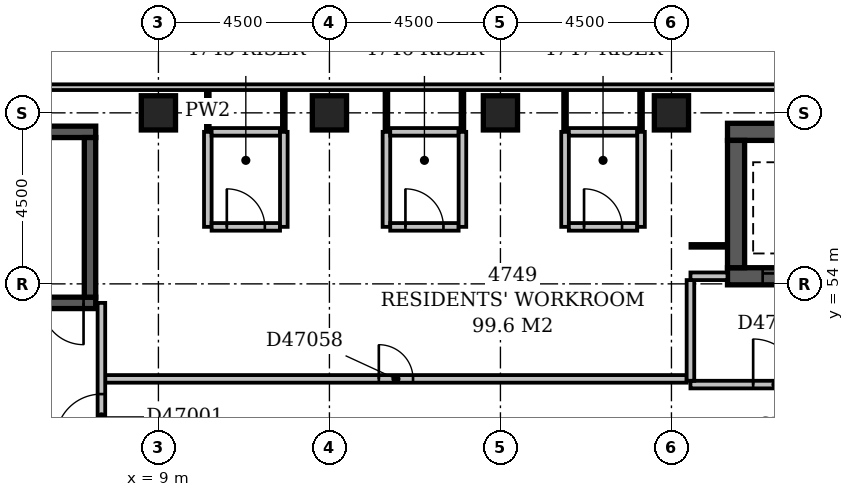
"""IFC4 building model, lengths in metres.
Left out: names, types, materials, properties, quantities, classifications, styles, units other than length and angle.
Written with IfcOpenShell. Run it as: python <this file> out.ifc"""

import sys

from ifc_helpers import new_model, si_unit, direction, frame, frame_2d, origin, origin_2d, place, context, subcontext, project, spatial, rectangle, extrude, element, fill, save


model = new_model("IFC4")
c1 = context("Model", 3, precision=1e-05, world=origin(), true_north=direction((0.0, 1.0)))
c2 = subcontext(c1, "Body", "Model", "MODEL_VIEW")
j1 = project(units=[si_unit("LENGTHUNIT", "METRE"), si_unit("PLANEANGLEUNIT", "RADIAN")], contexts=[c1])
p1 = place(None, origin())
s1 = spatial("IfcSite", under=j1, at=p1, CompositionType="ELEMENT")
p2 = place(p1, origin())
s2 = spatial("IfcBuilding", under=s1, at=p2, CompositionType="ELEMENT")
p3 = place(p2, frame((0.0, 0.0, 186.2)))
s3 = spatial("IfcBuildingStorey", under=s2, at=p3, CompositionType="ELEMENT", Elevation=186.2)
p4 = place(p3, frame((0.35, 53.5, -0.35), z_axis=(0.0, 0.0, 1.0), x_axis=(1.0, 0.0, 0.0)))
e1 = element("IfcWall", 1, at=p4, inside=s3, PredefinedType="SHEAR", context=c2, shape_type="SweptSolid", body=[
    extrude(rectangle(XDim=7.0, YDim=0.3, at=frame_2d((3.5, 0.0))), origin(), (0.0, 0.0, 1.0), 3.65),
])
p5 = place(p4, frame((5.58, 0.0, 0.35)))
e2 = element("IfcOpeningElement", 2, at=p5, cuts=e1, PredefinedType="OPENING", context=c2, shape_type="SweptSolid", body=[
    extrude(rectangle(XDim=1.1, YDim=2.1, at=frame_2d((0.55, 1.05))), frame((0.0, 0.162, 0.0), z_axis=(0.0, -1.0, 0.0), x_axis=(1.0, 0.0, 0.0)), (0.0, 0.0, 1.0), 0.324),
])
p6 = place(p3, frame((0.35, 58.0, -0.35), z_axis=(0.0, 0.0, 1.0), x_axis=(1.0, 0.0, 0.0)))
e3 = element("IfcWall", 3, at=p6, inside=s3, PredefinedType="SHEAR", context=c2, shape_type="SweptSolid", body=[
    extrude(rectangle(XDim=7.0, YDim=0.3, at=frame_2d((3.5, 0.0))), origin(), (0.0, 0.0, 1.0), 3.65),
])
p7 = place(p3, frame((7.2, 53.65, -0.35), z_axis=(0.0, 0.0, 1.0), x_axis=(0.0, 1.0, 0.0)))
e4 = element("IfcWall", 4, at=p7, inside=s3, PredefinedType="SHEAR", context=c2, shape_type="SweptSolid", body=[
    extrude(rectangle(XDim=4.2, YDim=0.3, at=frame_2d((2.1, 0.0))), origin(), (0.0, 0.0, 1.0), 3.65),
])
p8 = place(p3, frame((23.975, 54.2, -0.35), z_axis=(0.0, 0.0, 1.0), x_axis=(1.0, 0.0, 0.0)))
e5 = element("IfcWall", 5, at=p8, inside=s3, PredefinedType="SHEAR", context=c2, shape_type="SweptSolid", body=[
    extrude(rectangle(XDim=2.95, YDim=0.45, at=frame_2d((1.475, 0.0))), origin(), (0.0, 0.0, 1.0), 3.65),
])
p9 = place(p8, frame((0.925, 0.0, 0.35)))
e6 = element("IfcOpeningElement", 6, at=p9, cuts=e5, PredefinedType="OPENING", context=c2, shape_type="SweptSolid", body=[
    extrude(rectangle(XDim=1.1, YDim=2.1, at=frame_2d((0.55, 1.05))), frame((0.0, 0.237, 0.0), z_axis=(0.0, -1.0, 0.0), x_axis=(1.0, 0.0, 0.0)), (0.0, 0.0, 1.0), 0.474),
])
p10 = place(p3, frame((23.975, 58.0, -0.35), z_axis=(0.0, 0.0, 1.0), x_axis=(1.0, 0.0, 0.0)))
e7 = element("IfcWall", 7, at=p10, inside=s3, PredefinedType="SHEAR", context=c2, shape_type="SweptSolid", body=[
    extrude(rectangle(XDim=2.95, YDim=0.45, at=frame_2d((1.475, 0.0))), origin(), (0.0, 0.0, 1.0), 3.65),
])
p11 = place(p3, frame((24.2, 54.425, -0.35), z_axis=(0.0, 0.0, 1.0), x_axis=(0.0, 1.0, 0.0)))
e8 = element("IfcWall", 8, at=p11, inside=s3, PredefinedType="SHEAR", context=c2, shape_type="SweptSolid", body=[
    extrude(rectangle(XDim=3.35, YDim=0.45, at=frame_2d((1.675, 0.0))), origin(), (0.0, 0.0, 1.0), 3.65),
])
for number, where, z_axis, x_axis in (
    (9, (9.0, 58.5, -0.35), (0.0, 0.0, 1.0), (1.0, 0.0, 0.0)),
    (10, (13.5, 58.5, -0.35), (0.0, 0.0, 1.0), (1.0, 0.0, 0.0)),
    (11, (18.0, 58.5, -0.35), (0.0, 0.0, 1.0), (1.0, 0.0, 0.0)),
    (12, (22.5, 58.5, -0.35), (0.0, 0.0, 1.0), (1.0, 0.0, 0.0)),
):
    element("IfcColumn", number, at=place(p3, frame(where, z_axis=z_axis, x_axis=x_axis)), inside=s3, PredefinedType="COLUMN", context=c2, shape_type="SweptSolid", body=[
        extrude(rectangle(XDim=0.9, YDim=0.9, at=origin_2d()), origin(), (0.0, 0.0, 1.0), 3.65),
    ])
p12 = place(p3, frame((50.1, 59.175, 0.0), z_axis=(0.0, 0.0, 1.0), x_axis=(-1.0, 0.0, 0.0)))
e13 = element("IfcWall", 13, at=p12, inside=s3, PredefinedType="STANDARD", context=c2, shape_type="SweptSolid", body=[
    extrude(rectangle(XDim=50.85, YDim=0.15, at=frame_2d((25.425, 0.0))), origin(), (0.0, 0.0, 1.0), 2.7),
])
p13 = place(p12, frame((19.65, 0.0, 0.6)))
e14 = element("IfcOpeningElement", 14, at=p13, cuts=e13, PredefinedType="OPENING", context=c2, shape_type="SweptSolid", body=[
    extrude(rectangle(XDim=2.4, YDim=1.8, at=frame_2d((1.2, 0.9))), frame((0.0, 0.087, 0.0), z_axis=(0.0, -1.0, 0.0), x_axis=(1.0, 0.0, 0.0)), (0.0, 0.0, 1.0), 0.174),
])
p14 = place(p3, frame((23.0, 51.35, 0.0), z_axis=(0.0, 0.0, 1.0), x_axis=(1.0, 0.0, 0.0)))
e15 = element("IfcWall", 15, at=p14, inside=s3, PredefinedType="PARTITIONING", context=c2, shape_type="SweptSolid", body=[
    extrude(rectangle(XDim=4.8, YDim=0.2, at=frame_2d((2.4, 0.0))), origin(), (0.0, 0.0, 1.0), 3.3),
])
p15 = place(p14, frame((1.65, 0.0, 0.0)))
e16 = element("IfcOpeningElement", 16, at=p15, cuts=e15, PredefinedType="OPENING", context=c2, shape_type="SweptSolid", body=[
    extrude(rectangle(XDim=1.2, YDim=2.1, at=frame_2d((0.6, 1.05))), frame((0.0, 0.112, 0.0), z_axis=(0.0, -1.0, 0.0), x_axis=(1.0, 0.0, 0.0)), (0.0, 0.0, 1.0), 0.224),
])
p16 = place(p3, frame((23.0, 54.2, 0.0), z_axis=(0.0, 0.0, 1.0), x_axis=(1.0, 0.0, 0.0)))
e17 = element("IfcWall", 17, at=p16, inside=s3, PredefinedType="PARTITIONING", context=c2, shape_type="SweptSolid", body=[
    extrude(rectangle(XDim=0.975, YDim=0.2, at=frame_2d((0.488, 0.0))), origin(), (0.0, 0.0, 1.0), 3.3),
])
p17 = place(p3, frame((23.0, 51.45, 0.0), z_axis=(0.0, 0.0, 1.0), x_axis=(0.0, 1.0, 0.0)))
e18 = element("IfcWall", 18, at=p17, inside=s3, PredefinedType="PARTITIONING", context=c2, shape_type="SweptSolid", body=[
    extrude(rectangle(XDim=2.65, YDim=0.2, at=frame_2d((1.325, 0.0))), origin(), (0.0, 0.0, 1.0), 3.3),
])
p18 = place(p3, frame((7.5, 49.6, 0.0), z_axis=(0.0, 0.0, 1.0), x_axis=(0.0, 1.0, 0.0)))
e19 = element("IfcWall", 19, at=p18, inside=s3, PredefinedType="PARTITIONING", context=c2, shape_type="SweptSolid", body=[
    extrude(rectangle(XDim=3.9, YDim=0.2, at=frame_2d((1.95, 0.0))), origin(), (0.0, 0.0, 1.0), 3.3),
])
p19 = place(p18, frame((0.3, 0.0, 0.0)))
e20 = element("IfcOpeningElement", 20, at=p19, cuts=e19, PredefinedType="OPENING", context=c2, shape_type="SweptSolid", body=[
    extrude(rectangle(XDim=1.2, YDim=2.1, at=frame_2d((0.6, 1.05))), frame((0.0, 0.112, 0.0), z_axis=(0.0, -1.0, 0.0), x_axis=(1.0, 0.0, 0.0)), (0.0, 0.0, 1.0), 0.224),
])
p20 = place(p3, frame((7.6, 51.5, 0.0), z_axis=(0.0, 0.0, 1.0), x_axis=(1.0, 0.0, 0.0)))
e21 = element("IfcWall", 21, at=p20, inside=s3, PredefinedType="PARTITIONING", context=c2, shape_type="SweptSolid", body=[
    extrude(rectangle(XDim=15.3, YDim=0.2, at=frame_2d((7.65, 0.0))), origin(), (0.0, 0.0, 1.0), 3.3),
])
p21 = place(p20, frame((7.2, 0.0, 0.0)))
e22 = element("IfcOpeningElement", 22, at=p21, cuts=e21, PredefinedType="OPENING", context=c2, shape_type="SweptSolid", body=[
    extrude(rectangle(XDim=0.9, YDim=2.1, at=frame_2d((0.45, 1.05))), frame((0.0, 0.112, 0.0), z_axis=(0.0, -1.0, 0.0), x_axis=(1.0, 0.0, 0.0)), (0.0, 0.0, 1.0), 0.224),
])
p22 = place(p3, frame((23.0, 55.0, 0.0), z_axis=(0.0, 0.0, 1.0), x_axis=(1.0, 0.0, 0.0)))
e23 = element("IfcWall", 23, at=p22, inside=s3, PredefinedType="PARTITIONING", context=c2, shape_type="SweptSolid", body=[
    extrude(rectangle(XDim=0.975, YDim=0.1, at=frame_2d((0.488, 0.0))), origin(), (0.0, 0.0, 1.0), 3.3),
])
p23 = place(p3, frame((10.3, 55.5, 0.0), z_axis=(0.0, 0.0, 1.0), x_axis=(0.0, 1.0, 0.0)))
e24 = element("IfcWall", 24, at=p23, inside=s3, PredefinedType="PARTITIONING", context=c2, shape_type="SweptSolid", body=[
    extrude(rectangle(XDim=2.5, YDim=0.2, at=frame_2d((1.25, 0.0))), origin(), (0.0, 0.0, 1.0), 3.3),
])
p24 = place(p3, frame((10.4, 55.5, 0.0), z_axis=(0.0, 0.0, 1.0), x_axis=(1.0, 0.0, 0.0)))
e25 = element("IfcWall", 25, at=p24, inside=s3, PredefinedType="PARTITIONING", context=c2, shape_type="SweptSolid", body=[
    extrude(rectangle(XDim=1.8, YDim=0.2, at=frame_2d((0.9, 0.0))), origin(), (0.0, 0.0, 1.0), 3.3),
])
p25 = place(p24, frame((0.4, 0.0, 0.0)))
e26 = element("IfcOpeningElement", 26, at=p25, cuts=e25, PredefinedType="OPENING", context=c2, shape_type="SweptSolid", body=[
    extrude(rectangle(XDim=1.0, YDim=2.1, at=frame_2d((0.5, 1.05))), frame((0.0, 0.112, 0.0), z_axis=(0.0, -1.0, 0.0), x_axis=(1.0, 0.0, 0.0)), (0.0, 0.0, 1.0), 0.224),
])
for number, where, z_axis, x_axis in (
    (27, (12.3, 55.5, 0.0), (0.0, 0.0, 1.0), (0.0, 1.0, 0.0)),
    (28, (15.0, 55.5, 0.0), (0.0, 0.0, 1.0), (0.0, 1.0, 0.0)),
):
    element("IfcWall", number, at=place(p3, frame(where, z_axis=z_axis, x_axis=x_axis)), inside=s3, PredefinedType="PARTITIONING", context=c2, shape_type="SweptSolid", body=[
        extrude(rectangle(XDim=2.5, YDim=0.2, at=frame_2d((1.25, 0.0))), origin(), (0.0, 0.0, 1.0), 3.3),
    ])
p26 = place(p3, frame((15.1, 55.5, 0.0), z_axis=(0.0, 0.0, 1.0), x_axis=(1.0, 0.0, 0.0)))
e29 = element("IfcWall", 29, at=p26, inside=s3, PredefinedType="PARTITIONING", context=c2, shape_type="SweptSolid", body=[
    extrude(rectangle(XDim=1.8, YDim=0.2, at=frame_2d((0.9, 0.0))), origin(), (0.0, 0.0, 1.0), 3.3),
])
p27 = place(p26, frame((0.4, 0.0, 0.0)))
e30 = element("IfcOpeningElement", 30, at=p27, cuts=e29, PredefinedType="OPENING", context=c2, shape_type="SweptSolid", body=[
    extrude(rectangle(XDim=1.0, YDim=2.1, at=frame_2d((0.5, 1.05))), frame((0.0, 0.112, 0.0), z_axis=(0.0, -1.0, 0.0), x_axis=(1.0, 0.0, 0.0)), (0.0, 0.0, 1.0), 0.224),
])
for number, where, z_axis, x_axis in (
    (31, (17.0, 55.5, 0.0), (0.0, 0.0, 1.0), (0.0, 1.0, 0.0)),
    (32, (19.7, 55.5, 0.0), (0.0, 0.0, 1.0), (0.0, 1.0, 0.0)),
):
    element("IfcWall", number, at=place(p3, frame(where, z_axis=z_axis, x_axis=x_axis)), inside=s3, PredefinedType="PARTITIONING", context=c2, shape_type="SweptSolid", body=[
        extrude(rectangle(XDim=2.5, YDim=0.2, at=frame_2d((1.25, 0.0))), origin(), (0.0, 0.0, 1.0), 3.3),
    ])
p28 = place(p3, frame((19.8, 55.5, 0.0), z_axis=(0.0, 0.0, 1.0), x_axis=(1.0, 0.0, 0.0)))
e33 = element("IfcWall", 33, at=p28, inside=s3, PredefinedType="PARTITIONING", context=c2, shape_type="SweptSolid", body=[
    extrude(rectangle(XDim=1.8, YDim=0.2, at=frame_2d((0.9, 0.0))), origin(), (0.0, 0.0, 1.0), 3.3),
])
p29 = place(p28, frame((0.4, 0.0, 0.0)))
e34 = element("IfcOpeningElement", 34, at=p29, cuts=e33, PredefinedType="OPENING", context=c2, shape_type="SweptSolid", body=[
    extrude(rectangle(XDim=1.0, YDim=2.1, at=frame_2d((0.5, 1.05))), frame((0.0, 0.112, 0.0), z_axis=(0.0, -1.0, 0.0), x_axis=(1.0, 0.0, 0.0)), (0.0, 0.0, 1.0), 0.224),
])
p30 = place(p3, frame((21.7, 55.5, 0.0), z_axis=(0.0, 0.0, 1.0), x_axis=(0.0, 1.0, 0.0)))
e35 = element("IfcWall", 35, at=p30, inside=s3, PredefinedType="PARTITIONING", context=c2, shape_type="SweptSolid", body=[
    extrude(rectangle(XDim=2.5, YDim=0.2, at=frame_2d((1.25, 0.0))), origin(), (0.0, 0.0, 1.0), 3.3),
])
p31 = place(p3, frame((10.3, 58.0, 0.0), z_axis=(0.0, 0.0, 1.0), x_axis=(0.0, 1.0, 0.0)))
e36 = element("IfcWall", 36, at=p31, inside=s3, PredefinedType="PARTITIONING", context=c2, shape_type="SweptSolid", body=[
    extrude(rectangle(XDim=1.1, YDim=0.1, at=frame_2d((0.55, 0.0))), origin(), (0.0, 0.0, 1.0), 3.3),
])
p32 = place(p3, frame((10.4, 58.0, 0.0), z_axis=(0.0, 0.0, 1.0), x_axis=(1.0, 0.0, 0.0)))
e37 = element("IfcWall", 37, at=p32, inside=s3, PredefinedType="PARTITIONING", context=c2, shape_type="SweptSolid", body=[
    extrude(rectangle(XDim=1.8, YDim=0.2, at=frame_2d((0.9, 0.0))), origin(), (0.0, 0.0, 1.0), 3.3),
])
for number, where, z_axis, x_axis in (
    (38, (12.3, 58.0, 0.0), (0.0, 0.0, 1.0), (0.0, 1.0, 0.0)),
    (39, (15.0, 58.0, 0.0), (0.0, 0.0, 1.0), (0.0, 1.0, 0.0)),
):
    element("IfcWall", number, at=place(p3, frame(where, z_axis=z_axis, x_axis=x_axis)), inside=s3, PredefinedType="PARTITIONING", context=c2, shape_type="SweptSolid", body=[
        extrude(rectangle(XDim=1.1, YDim=0.1, at=frame_2d((0.55, 0.0))), origin(), (0.0, 0.0, 1.0), 3.3),
    ])
p33 = place(p3, frame((15.1, 58.0, 0.0), z_axis=(0.0, 0.0, 1.0), x_axis=(1.0, 0.0, 0.0)))
e40 = element("IfcWall", 40, at=p33, inside=s3, PredefinedType="PARTITIONING", context=c2, shape_type="SweptSolid", body=[
    extrude(rectangle(XDim=1.8, YDim=0.2, at=frame_2d((0.9, 0.0))), origin(), (0.0, 0.0, 1.0), 3.3),
])
for number, where, z_axis, x_axis in (
    (41, (17.0, 58.0, 0.0), (0.0, 0.0, 1.0), (0.0, 1.0, 0.0)),
    (42, (19.7, 58.0, 0.0), (0.0, 0.0, 1.0), (0.0, 1.0, 0.0)),
):
    element("IfcWall", number, at=place(p3, frame(where, z_axis=z_axis, x_axis=x_axis)), inside=s3, PredefinedType="PARTITIONING", context=c2, shape_type="SweptSolid", body=[
        extrude(rectangle(XDim=1.1, YDim=0.1, at=frame_2d((0.55, 0.0))), origin(), (0.0, 0.0, 1.0), 3.3),
    ])
p34 = place(p3, frame((19.8, 58.0, 0.0), z_axis=(0.0, 0.0, 1.0), x_axis=(1.0, 0.0, 0.0)))
e43 = element("IfcWall", 43, at=p34, inside=s3, PredefinedType="PARTITIONING", context=c2, shape_type="SweptSolid", body=[
    extrude(rectangle(XDim=1.8, YDim=0.2, at=frame_2d((0.9, 0.0))), origin(), (0.0, 0.0, 1.0), 3.3),
])
p35 = place(p3, frame((21.7, 58.0, 0.0), z_axis=(0.0, 0.0, 1.0), x_axis=(0.0, 1.0, 0.0)))
e44 = element("IfcWall", 44, at=p35, inside=s3, PredefinedType="PARTITIONING", context=c2, shape_type="SweptSolid", body=[
    extrude(rectangle(XDim=1.1, YDim=0.1, at=frame_2d((0.55, 0.0))), origin(), (0.0, 0.0, 1.0), 3.3),
])
p36 = place(p19, origin())
e45 = element("IfcDoor", 45, at=p36, inside=s3, OperationType="SINGLE_SWING_LEFT", PredefinedType="DOOR", context=c2, shape_type="SweptSolid", body=[
    extrude(rectangle(XDim=1.2, YDim=2.1, at=frame_2d((0.6, 1.05))), frame((0.0, 0.025, 0.0), z_axis=(0.0, -1.0, 0.0), x_axis=(1.0, 0.0, 0.0)), (0.0, 0.0, 1.0), 0.05),
])
fill(e20, e45)
p37 = place(p15, origin())
e46 = element("IfcDoor", 46, at=p37, inside=s3, OperationType="SINGLE_SWING_LEFT", PredefinedType="DOOR", context=c2, shape_type="SweptSolid", body=[
    extrude(rectangle(XDim=1.2, YDim=2.1, at=frame_2d((0.6, 1.05))), frame((0.0, 0.025, 0.0), z_axis=(0.0, -1.0, 0.0), x_axis=(1.0, 0.0, 0.0)), (0.0, 0.0, 1.0), 0.05),
])
fill(e16, e46)
p38 = place(p9, origin())
e47 = element("IfcDoor", 47, at=p38, inside=s3, OperationType="SLIDING_TO_LEFT", PredefinedType="DOOR", context=c2, shape_type="SweptSolid", body=[
    extrude(rectangle(XDim=1.1, YDim=2.1, at=frame_2d((0.55, 1.05))), frame((0.0, 0.025, 0.0), z_axis=(0.0, -1.0, 0.0), x_axis=(1.0, 0.0, 0.0)), (0.0, 0.0, 1.0), 0.05),
])
fill(e6, e47)
p39 = place(p5, origin())
e48 = element("IfcDoor", 48, at=p39, inside=s3, OperationType="SINGLE_SWING_RIGHT", PredefinedType="DOOR", context=c2, shape_type="SweptSolid", body=[
    extrude(rectangle(XDim=1.1, YDim=2.1, at=frame_2d((0.55, 1.05))), frame((0.0, 0.025, 0.0), z_axis=(0.0, -1.0, 0.0), x_axis=(1.0, 0.0, 0.0)), (0.0, 0.0, 1.0), 0.05),
])
fill(e2, e48)
p40 = place(p21, origin())
e49 = element("IfcDoor", 49, at=p40, inside=s3, OperationType="SINGLE_SWING_LEFT", PredefinedType="DOOR", context=c2, shape_type="SweptSolid", body=[
    extrude(rectangle(XDim=0.9, YDim=2.1, at=frame_2d((0.45, 1.05))), frame((0.0, 0.025, 0.0), z_axis=(0.0, -1.0, 0.0), x_axis=(1.0, 0.0, 0.0)), (0.0, 0.0, 1.0), 0.05),
])
fill(e22, e49)
p41 = place(p25, origin())
e50 = element("IfcDoor", 50, at=p41, inside=s3, OperationType="SINGLE_SWING_LEFT", PredefinedType="DOOR", context=c2, shape_type="SweptSolid", body=[
    extrude(rectangle(XDim=1.0, YDim=2.1, at=frame_2d((0.5, 1.05))), frame((0.0, 0.025, 0.0), z_axis=(0.0, -1.0, 0.0), x_axis=(1.0, 0.0, 0.0)), (0.0, 0.0, 1.0), 0.05),
])
fill(e26, e50)
p42 = place(p27, origin())
e51 = element("IfcDoor", 51, at=p42, inside=s3, OperationType="SINGLE_SWING_LEFT", PredefinedType="DOOR", context=c2, shape_type="SweptSolid", body=[
    extrude(rectangle(XDim=1.0, YDim=2.1, at=frame_2d((0.5, 1.05))), frame((0.0, 0.025, 0.0), z_axis=(0.0, -1.0, 0.0), x_axis=(1.0, 0.0, 0.0)), (0.0, 0.0, 1.0), 0.05),
])
fill(e30, e51)
p43 = place(p29, origin())
e52 = element("IfcDoor", 52, at=p43, inside=s3, OperationType="SINGLE_SWING_LEFT", PredefinedType="DOOR", context=c2, shape_type="SweptSolid", body=[
    extrude(rectangle(XDim=1.0, YDim=2.1, at=frame_2d((0.5, 1.05))), frame((0.0, 0.025, 0.0), z_axis=(0.0, -1.0, 0.0), x_axis=(1.0, 0.0, 0.0)), (0.0, 0.0, 1.0), 0.05),
])
fill(e34, e52)
save(model, sys.argv[1])
